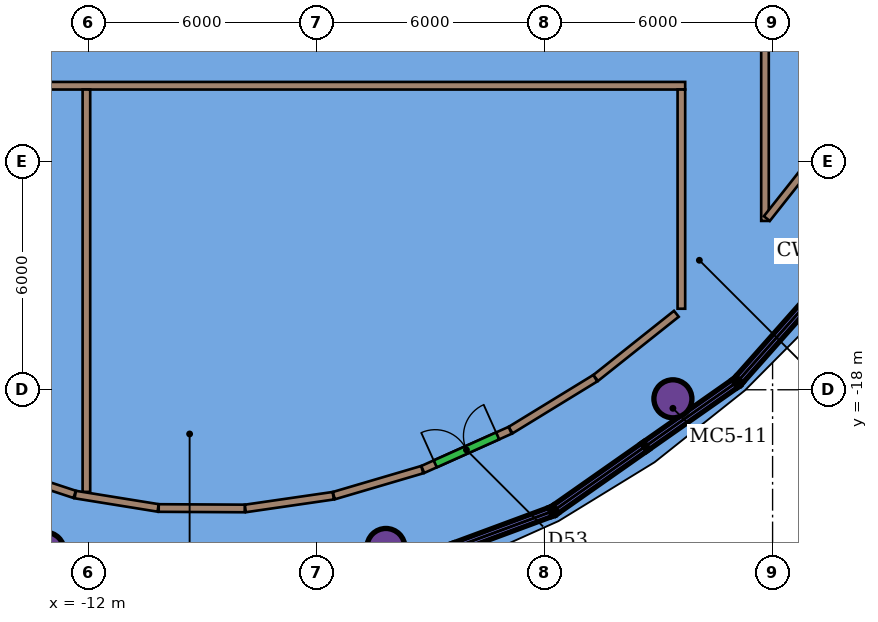
"""IFC4 building model, lengths in metres.
Left out: names, types, materials, properties, quantities, classifications, styles, units other than length and angle.
Written with IfcOpenShell. Run it as: python <this file> out.ifc"""

import sys

from ifc_helpers import new_model, si_unit, direction, frame, frame_2d, origin, origin_2d, place, context, subcontext, project, spatial, rectangle, hollow_circle, extrude, element, fill, save


model = new_model("IFC4")
c1 = context("Model", 3, precision=1e-05, world=origin(), true_north=direction((0.0, 1.0)))
c2 = subcontext(c1, "Body", "Model", "MODEL_VIEW")
j1 = project(units=[si_unit("LENGTHUNIT", "METRE"), si_unit("PLANEANGLEUNIT", "RADIAN")], contexts=[c1])
p1 = place(None, origin())
s1 = spatial("IfcSite", under=j1, at=p1, CompositionType="ELEMENT")
p2 = place(p1, origin())
s2 = spatial("IfcBuilding", under=s1, at=p2, CompositionType="ELEMENT")
p3 = place(p2, frame((0.0, 0.0, 325.5)))
s3 = spatial("IfcBuildingStorey", under=s2, at=p3, CompositionType="ELEMENT", Elevation=325.5)
for number, where, z_axis, x_axis in (
    (1, (-13.138, -22.247, 0.0), (0.0, 0.0, 1.0), (1.0, 0.0, 0.0)),
    (2, (-4.175, -22.149, 0.0), (0.0, 0.0, 1.0), (1.0, 0.0, 0.0)),
    (3, (3.377, -18.238, 0.0), (0.0, 0.0, 1.0), (1.0, 0.0, 0.0)),
):
    element("IfcColumn", number, at=place(p3, frame(where, z_axis=z_axis, x_axis=x_axis)), inside=s3, PredefinedType="COLUMN", context=c2, shape_type="SweptSolid", body=[
        extrude(hollow_circle(Radius=0.5, WallThickness=0.04, at=origin_2d()), origin(), (0.0, 0.0, 1.0), 3.75),
    ])
p4 = place(p3, frame((-17.9, -10.0, 0.0), z_axis=(0.0, 0.0, 1.0), x_axis=(1.0, 0.0, 0.0)))
e4 = element("IfcWall", 4, at=p4, inside=s3, PredefinedType="PARTITIONING", context=c2, shape_type="SweptSolid", body=[
    extrude(rectangle(XDim=21.6, YDim=0.2, at=frame_2d((10.8, 0.0))), origin(), (0.0, 0.0, 1.0), 3.25),
])
p5 = place(p3, frame((5.8, -13.558, 0.0), z_axis=(0.0, 0.0, 1.0), x_axis=(0.0, 1.0, 0.0)))
e5 = element("IfcWall", 5, at=p5, inside=s3, PredefinedType="PARTITIONING", context=c2, shape_type="SweptSolid", body=[
    extrude(rectangle(XDim=21.458, YDim=0.2, at=frame_2d((10.729, 0.0))), origin(), (0.0, 0.0, 1.0), 3.25),
])
p6 = place(p3, frame((3.6, -15.867, 0.0), z_axis=(0.0, 0.0, 1.0), x_axis=(0.0, 1.0, 0.0)))
e6 = element("IfcWall", 6, at=p6, inside=s3, PredefinedType="PARTITIONING", context=c2, shape_type="SweptSolid", body=[
    extrude(rectangle(XDim=5.767, YDim=0.2, at=frame_2d((2.884, 0.0))), origin(), (0.0, 0.0, 1.0), 3.25),
])
p7 = place(p3, frame((-12.056, -20.687, 0.0), z_axis=(0.0, 0.0, 1.0), x_axis=(0.0, 1.0, 0.0)))
e7 = element("IfcWall", 7, at=p7, inside=s3, PredefinedType="PARTITIONING", context=c2, shape_type="SweptSolid", body=[
    extrude(rectangle(XDim=10.587, YDim=0.2, at=frame_2d((5.293, 0.0))), origin(), (0.0, 0.0, 1.0), 3.25),
])
p8 = place(p3, frame((-12.35, -20.757, 0.0), z_axis=(0.0, 0.0, 1.0), x_axis=(0.987257926423, -0.159128208423, 0.0)))
e8 = element("IfcWall", 8, at=p8, inside=s3, PredefinedType="PARTITIONING", context=c2, shape_type="SweptSolid", body=[
    extrude(rectangle(XDim=2.209, YDim=0.2, at=frame_2d((1.104, 0.0))), origin(), (0.0, 0.0, 1.0), 3.25),
])
p9 = place(p3, frame((-14.437, -20.07, 0.0), z_axis=(0.0, 0.0, 1.0), x_axis=(0.949852302688, -0.312698901627, 0.0)))
e9 = element("IfcWall", 9, at=p9, inside=s3, PredefinedType="PARTITIONING", context=c2, shape_type="SweptSolid", body=[
    extrude(rectangle(XDim=2.181, YDim=0.2, at=frame_2d((1.09, 0.0))), origin(), (0.0, 0.0, 1.0), 3.25),
])
p10 = place(p3, frame((1.345, -17.689, 0.0), z_axis=(0.0, 0.0, 1.0), x_axis=(0.782665833332, 0.62244212047, 0.0)))
e10 = element("IfcWall", 10, at=p10, inside=s3, PredefinedType="PARTITIONING", context=c2, shape_type="SweptSolid", body=[
    extrude(rectangle(XDim=2.712, YDim=0.2, at=frame_2d((1.356, 0.0))), origin(), (0.0, 0.0, 1.0), 3.25),
])
p11 = place(p3, frame((-0.894, -19.061, 0.0), z_axis=(0.0, 0.0, 1.0), x_axis=(0.852667029926, 0.522454721557, 0.0)))
e11 = element("IfcWall", 11, at=p11, inside=s3, PredefinedType="PARTITIONING", context=c2, shape_type="SweptSolid", body=[
    extrude(rectangle(XDim=2.614, YDim=0.2, at=frame_2d((1.307, 0.0))), origin(), (0.0, 0.0, 1.0), 3.25),
])
p12 = place(p3, frame((-3.206, -20.097, 0.0), z_axis=(0.0, 0.0, 1.0), x_axis=(0.912552955942, 0.408958558538, 0.0)))
e12 = element("IfcWall", 12, at=p12, inside=s3, PredefinedType="PARTITIONING", context=c2, shape_type="SweptSolid", body=[
    extrude(rectangle(XDim=2.521, YDim=0.2, at=frame_2d((1.26, 0.0))), origin(), (0.0, 0.0, 1.0), 3.25),
])
p13 = place(p12, frame((0.36, 0.0, 0.0)))
e13 = element("IfcOpeningElement", 13, at=p13, cuts=e12, PredefinedType="OPENING", context=c2, shape_type="SweptSolid", body=[
    extrude(rectangle(XDim=1.8, YDim=2.4, at=frame_2d((0.9, 1.2))), frame((0.0, 0.11, 0.0), z_axis=(0.0, -1.0, 0.0), x_axis=(1.0, 0.0, 0.0)), (0.0, 0.0, 1.0), 0.22),
])
p14 = place(p3, frame((-5.547, -20.786, 0.0), z_axis=(0.0, 0.0, 1.0), x_axis=(0.95934146389, 0.28224803925, 0.0)))
e14 = element("IfcWall", 14, at=p14, inside=s3, PredefinedType="PARTITIONING", context=c2, shape_type="SweptSolid", body=[
    extrude(rectangle(XDim=2.426, YDim=0.2, at=frame_2d((1.213, 0.0))), origin(), (0.0, 0.0, 1.0), 3.25),
])
p15 = place(p3, frame((-7.875, -21.123, 0.0), z_axis=(0.0, 0.0, 1.0), x_axis=(0.989671979467, 0.143350525141, 0.0)))
e15 = element("IfcWall", 15, at=p15, inside=s3, PredefinedType="PARTITIONING", context=c2, shape_type="SweptSolid", body=[
    extrude(rectangle(XDim=2.338, YDim=0.2, at=frame_2d((1.169, 0.0))), origin(), (0.0, 0.0, 1.0), 3.25),
])
p16 = place(p3, frame((-10.154, -21.111, 0.0), z_axis=(0.0, 0.0, 1.0), x_axis=(0.999986603133, -0.005176248997, 0.0)))
e16 = element("IfcWall", 16, at=p16, inside=s3, PredefinedType="PARTITIONING", context=c2, shape_type="SweptSolid", body=[
    extrude(rectangle(XDim=2.264, YDim=0.2, at=frame_2d((1.132, 0.0))), origin(), (0.0, 0.0, 1.0), 3.25),
])
p17 = place(p3, frame((5.849, -13.496, 0.0), z_axis=(0.0, 0.0, 1.0), x_axis=(0.620321195124, 0.784347891487, 0.0)))
e17 = element("IfcWall", 17, at=p17, inside=s3, PredefinedType="PARTITIONING", context=c2, shape_type="SweptSolid", body=[
    extrude(rectangle(XDim=2.163, YDim=0.2, at=frame_2d((1.081, 0.0))), origin(), (0.0, 0.0, 1.0), 3.25),
])
p18 = place(p13, origin())
e18 = element("IfcDoor", 18, at=p18, inside=s3, OperationType="DOUBLE_DOOR_SINGLE_SWING", PredefinedType="DOOR", context=c2, shape_type="SweptSolid", body=[
    extrude(rectangle(XDim=1.8, YDim=2.4, at=frame_2d((0.9, 1.2))), frame((0.0, 0.025, 0.0), z_axis=(0.0, -1.0, 0.0), x_axis=(1.0, 0.0, 0.0)), (0.0, 0.0, 1.0), 0.05),
])
fill(e13, e18)
save(model, sys.argv[1])
